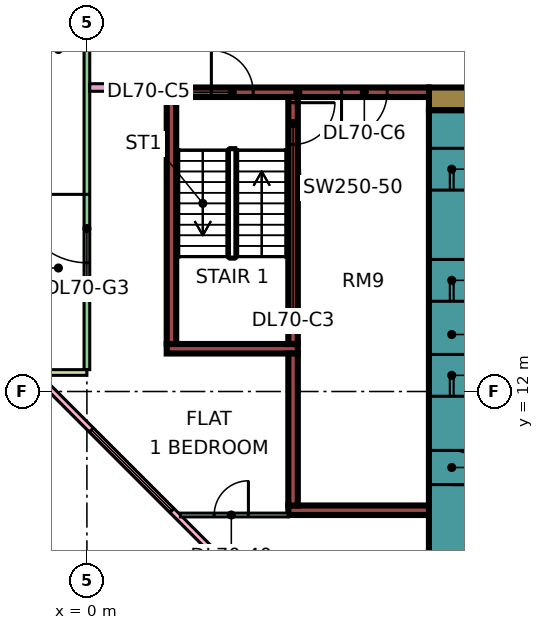
"""IFC4 building model, lengths in metres.
Left out: names, types, materials, properties, quantities, classifications, styles, units other than length and angle.
Written with IfcOpenShell. Run it as: python <this file> out.ifc"""

import sys

from ifc_helpers import new_model, si_unit, direction, frame, frame_2d, origin, place, context, subcontext, project, spatial, rectangle, extrude, element, fill, save


model = new_model("IFC4")
c1 = context("Model", 3, precision=1e-05, world=origin(), true_north=direction((0.0, 1.0)))
c2 = subcontext(c1, "Body", "Model", "MODEL_VIEW")
j1 = project(units=[si_unit("LENGTHUNIT", "METRE"), si_unit("PLANEANGLEUNIT", "RADIAN")], contexts=[c1])
p1 = place(None, origin())
s1 = spatial("IfcSite", under=j1, at=p1, CompositionType="ELEMENT")
p2 = place(p1, origin())
s2 = spatial("IfcBuilding", under=s1, at=p2, CompositionType="ELEMENT")
p3 = place(p2, frame((0.0, 0.0, 299.65)))
s3 = spatial("IfcBuildingStorey", under=s2, at=p3, CompositionType="ELEMENT", Elevation=299.65)
p4 = place(p3, frame((9.0, 19.7, 0.0), z_axis=(0.0, 0.0, 1.0), x_axis=(1.0, 0.0, 0.0)))
e1 = element("IfcWall", 1, at=p4, inside=s3, PredefinedType="SHEAR", context=c2, shape_type="SweptSolid", body=[
    extrude(rectangle(XDim=25.0, YDim=0.6, at=frame_2d((12.5, 0.0))), origin(), (0.0, 0.0, 1.0), 3.75),
])
p5 = place(p4, frame((19.1, 0.0, 0.0)))
e2 = element("IfcOpeningElement", 2, at=p5, cuts=e1, PredefinedType="OPENING", context=c2, shape_type="SweptSolid", body=[
    extrude(rectangle(XDim=1.8, YDim=2.4, at=frame_2d((0.9, 1.2))), frame((0.0, 0.31, 0.0), z_axis=(0.0, -1.0, 0.0), x_axis=(1.0, 0.0, 0.0)), (0.0, 0.0, 1.0), 0.62),
])
p6 = place(p3, frame((9.6, 7.6, 0.0), z_axis=(0.0, 0.0, 1.0), x_axis=(0.0, 1.0, 0.0)))
e3 = element("IfcWall", 3, at=p6, inside=s3, PredefinedType="SHEAR", context=c2, shape_type="SweptSolid", body=[
    extrude(rectangle(XDim=11.8, YDim=1.2, at=frame_2d((5.9, 0.0))), origin(), (0.0, 0.0, 1.0), 3.75),
])
p7 = place(p6, frame((4.275, 0.0, 0.0)))
e4 = element("IfcOpeningElement", 4, at=p7, cuts=e3, PredefinedType="OPENING", context=c2, shape_type="SweptSolid", body=[
    extrude(rectangle(XDim=1.1, YDim=2.2, at=frame_2d((0.55, 1.1))), frame((0.0, 0.61, 0.0), z_axis=(0.0, -1.0, 0.0), x_axis=(1.0, 0.0, 0.0)), (0.0, 0.0, 1.0), 1.22),
])
p8 = place(p6, frame((6.775, 0.0, 0.0)))
e5 = element("IfcOpeningElement", 5, at=p8, cuts=e3, PredefinedType="OPENING", context=c2, shape_type="SweptSolid", body=[
    extrude(rectangle(XDim=1.1, YDim=2.2, at=frame_2d((0.55, 1.1))), frame((0.0, 0.61, 0.0), z_axis=(0.0, -1.0, 0.0), x_axis=(1.0, 0.0, 0.0)), (0.0, 0.0, 1.0), 1.22),
])
p9 = place(p6, frame((9.7, 0.0, 0.0)))
e6 = element("IfcOpeningElement", 6, at=p9, cuts=e3, PredefinedType="OPENING", context=c2, shape_type="SweptSolid", body=[
    extrude(rectangle(XDim=1.1, YDim=2.2, at=frame_2d((0.55, 1.1))), frame((0.0, 0.61, 0.0), z_axis=(0.0, -1.0, 0.0), x_axis=(1.0, 0.0, 0.0)), (0.0, 0.0, 1.0), 1.22),
])
p10 = place(p6, frame((1.95, 0.0, 0.0)))
e7 = element("IfcOpeningElement", 7, at=p10, cuts=e3, PredefinedType="OPENING", context=c2, shape_type="SweptSolid", body=[
    extrude(rectangle(XDim=0.9, YDim=2.1, at=frame_2d((0.45, 1.05))), frame((0.0, 0.61, 0.0), z_axis=(0.0, -1.0, 0.0), x_axis=(1.0, 0.0, 0.0)), (0.0, 0.0, 1.0), 1.22),
])
p11 = place(p3, frame((2.1, 19.875, 0.0), z_axis=(0.0, 0.0, 1.0), x_axis=(1.0, 0.0, 0.0)))
e8 = element("IfcWall", 8, at=p11, inside=s3, PredefinedType="SHEAR", context=c2, shape_type="SweptSolid", body=[
    extrude(rectangle(XDim=6.9, YDim=0.25, at=frame_2d((3.45, 0.0))), origin(), (0.0, 0.0, 1.0), 3.75),
])
p12 = place(p11, frame((1.175, 0.0, 0.0)))
e9 = element("IfcOpeningElement", 9, at=p12, cuts=e8, PredefinedType="OPENING", context=c2, shape_type="SweptSolid", body=[
    extrude(rectangle(XDim=1.1, YDim=2.2, at=frame_2d((0.55, 1.1))), frame((0.0, 0.135, 0.0), z_axis=(0.0, -1.0, 0.0), x_axis=(1.0, 0.0, 0.0)), (0.0, 0.0, 1.0), 0.27),
])
p13 = place(p11, frame((4.6, 0.0, 0.0)))
e10 = element("IfcOpeningElement", 10, at=p13, cuts=e8, PredefinedType="OPENING", context=c2, shape_type="SweptSolid", body=[
    extrude(rectangle(XDim=1.2, YDim=2.2, at=frame_2d((0.6, 1.1))), frame((0.0, 0.135, 0.0), z_axis=(0.0, -1.0, 0.0), x_axis=(1.0, 0.0, 0.0)), (0.0, 0.0, 1.0), 0.27),
])
p14 = place(p3, frame((2.1, 13.125, 0.0), z_axis=(0.0, 0.0, 1.0), x_axis=(1.0, 0.0, 0.0)))
e11 = element("IfcWall", 11, at=p14, inside=s3, PredefinedType="SHEAR", context=c2, shape_type="SweptSolid", body=[
    extrude(rectangle(XDim=3.45, YDim=0.25, at=frame_2d((1.725, 0.0))), origin(), (0.0, 0.0, 1.0), 3.75),
])
p15 = place(p3, frame((2.225, 13.25, 0.0), z_axis=(0.0, 0.0, 1.0), x_axis=(0.0, 1.0, 0.0)))
e12 = element("IfcWall", 12, at=p15, inside=s3, PredefinedType="SHEAR", context=c2, shape_type="SweptSolid", body=[
    extrude(rectangle(XDim=6.5, YDim=0.25, at=frame_2d((3.25, 0.0))), origin(), (0.0, 0.0, 1.0), 3.75),
])
p16 = place(p3, frame((5.425, 13.25, 0.0), z_axis=(0.0, 0.0, 1.0), x_axis=(0.0, 1.0, 0.0)))
e13 = element("IfcWall", 13, at=p16, inside=s3, PredefinedType="SHEAR", context=c2, shape_type="SweptSolid", body=[
    extrude(rectangle(XDim=6.5, YDim=0.25, at=frame_2d((3.25, 0.0))), origin(), (0.0, 0.0, 1.0), 3.75),
])
p17 = place(p16, frame((5.25, 0.0, 0.0)))
e14 = element("IfcOpeningElement", 14, at=p17, cuts=e13, PredefinedType="OPENING", context=c2, shape_type="SweptSolid", body=[
    extrude(rectangle(XDim=1.1, YDim=2.2, at=frame_2d((0.55, 1.1))), frame((0.0, 0.135, 0.0), z_axis=(0.0, -1.0, 0.0), x_axis=(1.0, 0.0, 0.0)), (0.0, 0.0, 1.0), 0.27),
])
p18 = place(p3, frame((5.3, 8.875, 0.0), z_axis=(0.0, 0.0, 1.0), x_axis=(1.0, 0.0, 0.0)))
e15 = element("IfcWall", 15, at=p18, inside=s3, PredefinedType="SHEAR", context=c2, shape_type="SweptSolid", body=[
    extrude(rectangle(XDim=3.7, YDim=0.25, at=frame_2d((1.85, 0.0))), origin(), (0.0, 0.0, 1.0), 3.75),
])
p19 = place(p3, frame((5.425, 9.0, 0.0), z_axis=(0.0, 0.0, 1.0), x_axis=(0.0, 1.0, 0.0)))
e16 = element("IfcWall", 16, at=p19, inside=s3, PredefinedType="SHEAR", context=c2, shape_type="SweptSolid", body=[
    extrude(rectangle(XDim=4.0, YDim=0.25, at=frame_2d((2.0, 0.0))), origin(), (0.0, 0.0, 1.0), 3.75),
])
p20 = place(p3, frame((0.0, 23.925, 0.0), z_axis=(0.0, 0.0, 1.0), x_axis=(0.0, -1.0, 0.0)))
e17 = element("IfcWall", 17, at=p20, inside=s3, PredefinedType="SOLIDWALL", context=c2, shape_type="SweptSolid", body=[
    extrude(rectangle(XDim=11.35, YDim=0.15, at=frame_2d((5.675, 0.0))), origin(), (0.0, 0.0, 1.0), 3.35),
])
p21 = place(p20, frame((6.738, 0.0, 0.0)))
e18 = element("IfcOpeningElement", 18, at=p21, cuts=e17, PredefinedType="OPENING", context=c2, shape_type="SweptSolid", body=[
    extrude(rectangle(XDim=1.8, YDim=2.4, at=frame_2d((0.9, 1.2))), frame((0.0, 0.085, 0.0), z_axis=(0.0, -1.0, 0.0), x_axis=(1.0, 0.0, 0.0)), (0.0, 0.0, 1.0), 0.17),
])
p22 = place(p3, frame((-1.5, 12.5, 0.0), z_axis=(0.0, 0.0, 1.0), x_axis=(1.0, 0.0, 0.0)))
e19 = element("IfcWall", 19, at=p22, inside=s3, PredefinedType="SOLIDWALL", context=c2, shape_type="SweptSolid", body=[
    extrude(rectangle(XDim=1.5, YDim=0.15, at=frame_2d((0.75, 0.0))), origin(), (0.0, 0.0, 1.0), 3.35),
])
p23 = place(p3, frame((-1.447, 12.553, 0.0), z_axis=(0.0, 0.0, 1.0), x_axis=(0.707106781187, -0.707106781187, 0.0)))
e20 = element("IfcWall", 20, at=p23, inside=s3, PredefinedType="SOLIDWALL", context=c2, shape_type="SweptSolid", body=[
    extrude(rectangle(XDim=19.799, YDim=0.15, at=frame_2d((9.899, 0.0))), origin(), (0.0, 0.0, 1.0), 3.35),
])
p24 = place(p23, frame((2.212, 0.0, 0.45)))
e21 = element("IfcOpeningElement", 21, at=p24, cuts=e20, PredefinedType="OPENING", context=c2, shape_type="SweptSolid", body=[
    extrude(rectangle(XDim=3.0, YDim=2.4, at=frame_2d((1.5, 1.2))), frame((0.0, 0.085, 0.0), z_axis=(0.0, -1.0, 0.0), x_axis=(1.0, 0.0, 0.0)), (0.0, 0.0, 1.0), 0.17),
])
p25 = place(p23, frame((10.216, 0.0, 0.45)))
e22 = element("IfcOpeningElement", 22, at=p25, cuts=e20, PredefinedType="OPENING", context=c2, shape_type="SweptSolid", body=[
    extrude(rectangle(XDim=3.0, YDim=2.4, at=frame_2d((1.5, 1.2))), frame((0.0, 0.085, 0.0), z_axis=(0.0, -1.0, 0.0), x_axis=(1.0, 0.0, 0.0)), (0.0, 0.0, 1.0), 0.17),
])
p26 = place(p3, frame((0.074, 20.0, 0.0), z_axis=(0.0, 0.0, 1.0), x_axis=(1.0, 0.0, 0.0)))
e23 = element("IfcWall", 23, at=p26, inside=s3, PredefinedType="PARTITIONING", context=c2, shape_type="SweptSolid", body=[
    extrude(rectangle(XDim=2.026, YDim=0.2, at=frame_2d((1.013, 0.0))), origin(), (0.0, 0.0, 1.0), 3.35),
])
p27 = place(p3, frame((2.461, 8.75, 0.0), z_axis=(0.0, 0.0, 1.0), x_axis=(1.0, 0.0, 0.0)))
e24 = element("IfcWall", 24, at=p27, inside=s3, PredefinedType="PARTITIONING", context=c2, shape_type="SweptSolid", body=[
    extrude(rectangle(XDim=2.839, YDim=0.1, at=frame_2d((1.419, 0.0))), origin(), (0.0, 0.0, 1.0), 3.35),
])
p28 = place(p27, frame((0.889, 0.0, 0.0)))
e25 = element("IfcOpeningElement", 25, at=p28, cuts=e24, PredefinedType="OPENING", context=c2, shape_type="SweptSolid", body=[
    extrude(rectangle(XDim=0.9, YDim=2.1, at=frame_2d((0.45, 1.05))), frame((0.0, 0.06, 0.0), z_axis=(0.0, -1.0, 0.0), x_axis=(1.0, 0.0, 0.0)), (0.0, 0.0, 1.0), 0.12),
])
p29 = place(p21, frame((1.8, 0.0, 0.0), z_axis=(0.0, 0.0, 1.0), x_axis=(-1.0, 0.0, 0.0)))
e26 = element("IfcDoor", 26, at=p29, inside=s3, OperationType="DOUBLE_DOOR_SINGLE_SWING", PredefinedType="DOOR", context=c2, shape_type="SweptSolid", body=[
    extrude(rectangle(XDim=1.8, YDim=2.4, at=frame_2d((0.9, 1.2))), frame((0.0, 0.025, 0.0), z_axis=(0.0, -1.0, 0.0), x_axis=(1.0, 0.0, 0.0)), (0.0, 0.0, 1.0), 0.05),
])
fill(e18, e26)
p30 = place(p24, origin())
e27 = element("IfcWindow", 27, at=p30, inside=s3, PartitioningType="SINGLE_PANEL", PredefinedType="WINDOW", context=c2, shape_type="SweptSolid", body=[
    extrude(rectangle(XDim=3.0, YDim=2.4, at=frame_2d((1.5, 1.2))), frame((0.0, 0.03, 0.0), z_axis=(0.0, -1.0, 0.0), x_axis=(1.0, 0.0, 0.0)), (0.0, 0.0, 1.0), 0.06),
])
fill(e21, e27)
p31 = place(p7, origin())
e28 = element("IfcDoor", 28, at=p31, inside=s3, OperationType="DOUBLE_DOOR_SLIDING", PredefinedType="DOOR", context=c2, shape_type="SweptSolid", body=[
    extrude(rectangle(XDim=1.1, YDim=2.2, at=frame_2d((0.55, 1.1))), frame((0.0, 0.025, 0.0), z_axis=(0.0, -1.0, 0.0), x_axis=(1.0, 0.0, 0.0)), (0.0, 0.0, 1.0), 0.05),
])
fill(e4, e28)
p32 = place(p8, origin())
e29 = element("IfcDoor", 29, at=p32, inside=s3, OperationType="DOUBLE_DOOR_SLIDING", PredefinedType="DOOR", context=c2, shape_type="SweptSolid", body=[
    extrude(rectangle(XDim=1.1, YDim=2.2, at=frame_2d((0.55, 1.1))), frame((0.0, 0.025, 0.0), z_axis=(0.0, -1.0, 0.0), x_axis=(1.0, 0.0, 0.0)), (0.0, 0.0, 1.0), 0.05),
])
fill(e5, e29)
p33 = place(p9, origin())
e30 = element("IfcDoor", 30, at=p33, inside=s3, OperationType="DOUBLE_DOOR_SLIDING", PredefinedType="DOOR", context=c2, shape_type="SweptSolid", body=[
    extrude(rectangle(XDim=1.1, YDim=2.2, at=frame_2d((0.55, 1.1))), frame((0.0, 0.025, 0.0), z_axis=(0.0, -1.0, 0.0), x_axis=(1.0, 0.0, 0.0)), (0.0, 0.0, 1.0), 0.05),
])
fill(e6, e30)
p34 = place(p17, origin())
e31 = element("IfcDoor", 31, at=p34, inside=s3, OperationType="SINGLE_SWING_RIGHT", PredefinedType="DOOR", context=c2, shape_type="SweptSolid", body=[
    extrude(rectangle(XDim=1.1, YDim=2.2, at=frame_2d((0.55, 1.1))), frame((0.0, 0.025, 0.0), z_axis=(0.0, -1.0, 0.0), x_axis=(1.0, 0.0, 0.0)), (0.0, 0.0, 1.0), 0.05),
])
fill(e14, e31)
p35 = place(p10, frame((0.9, 0.0, 0.0), z_axis=(0.0, 0.0, 1.0), x_axis=(-1.0, 0.0, 0.0)))
e32 = element("IfcDoor", 32, at=p35, inside=s3, OperationType="SINGLE_SWING_LEFT", PredefinedType="DOOR", context=c2, shape_type="SweptSolid", body=[
    extrude(rectangle(XDim=0.9, YDim=2.1, at=frame_2d((0.45, 1.05))), frame((0.0, 0.025, 0.0), z_axis=(0.0, -1.0, 0.0), x_axis=(1.0, 0.0, 0.0)), (0.0, 0.0, 1.0), 0.05),
])
fill(e7, e32)
p36 = place(p12, origin())
e33 = element("IfcDoor", 33, at=p36, inside=s3, OperationType="SINGLE_SWING_LEFT", PredefinedType="DOOR", context=c2, shape_type="SweptSolid", body=[
    extrude(rectangle(XDim=1.1, YDim=2.2, at=frame_2d((0.55, 1.1))), frame((0.0, 0.025, 0.0), z_axis=(0.0, -1.0, 0.0), x_axis=(1.0, 0.0, 0.0)), (0.0, 0.0, 1.0), 0.05),
])
fill(e9, e33)
p37 = place(p13, frame((1.2, 0.0, 0.0), z_axis=(0.0, 0.0, 1.0), x_axis=(-1.0, 0.0, 0.0)))
e34 = element("IfcDoor", 34, at=p37, inside=s3, OperationType="SINGLE_SWING_LEFT", PredefinedType="DOOR", context=c2, shape_type="SweptSolid", body=[
    extrude(rectangle(XDim=1.2, YDim=2.2, at=frame_2d((0.6, 1.1))), frame((0.0, 0.025, 0.0), z_axis=(0.0, -1.0, 0.0), x_axis=(1.0, 0.0, 0.0)), (0.0, 0.0, 1.0), 0.05),
])
fill(e10, e34)
p38 = place(p28, frame((0.9, 0.0, 0.0), z_axis=(0.0, 0.0, 1.0), x_axis=(-1.0, 0.0, 0.0)))
e35 = element("IfcDoor", 35, at=p38, inside=s3, OperationType="SINGLE_SWING_RIGHT", PredefinedType="DOOR", context=c2, shape_type="SweptSolid", body=[
    extrude(rectangle(XDim=0.9, YDim=2.1, at=frame_2d((0.45, 1.05))), frame((0.0, 0.025, 0.0), z_axis=(0.0, -1.0, 0.0), x_axis=(1.0, 0.0, 0.0)), (0.0, 0.0, 1.0), 0.05),
])
fill(e25, e35)
save(model, sys.argv[1])
